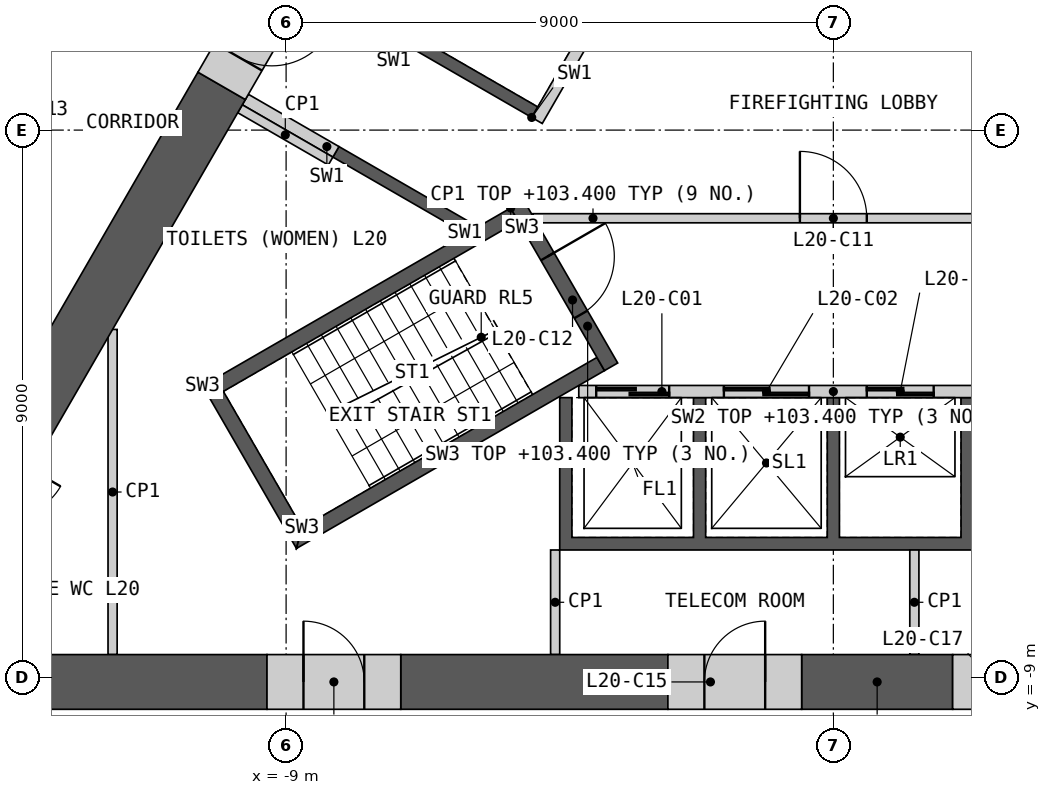
"""IFC4 building model, lengths in metres.
Left out: names, types, materials, properties, quantities, classifications, styles, units other than length and angle.
Written with IfcOpenShell. Run it as: python <this file> out.ifc"""

import sys

from ifc_helpers import new_model, si_unit, direction, frame, frame_2d, origin, place, context, subcontext, project, spatial, polyline, rectangle, outline, extrude, element, fill, save


model = new_model("IFC4")
c1 = context("Model", 3, precision=1e-05, world=origin(), true_north=direction((0.0, 1.0)))
c2 = subcontext(c1, "Body", "Model", "MODEL_VIEW")
j1 = project(units=[si_unit("LENGTHUNIT", "METRE"), si_unit("PLANEANGLEUNIT", "RADIAN")], contexts=[c1])
p1 = place(None, origin())
s1 = spatial("IfcSite", under=j1, at=p1, CompositionType="ELEMENT")
p2 = place(p1, origin())
s2 = spatial("IfcBuilding", under=s1, at=p2, CompositionType="ELEMENT")
p3 = place(p2, frame((0.0, 0.0, 99.6)))
s3 = spatial("IfcBuildingStorey", under=s2, at=p3, CompositionType="ELEMENT", Elevation=99.6)
p4 = place(p3, origin())
e1 = element("IfcWall", 1, at=p4, inside=s3, PredefinedType="SHEAR", context=c2, shape_type="SweptSolid", body=[
    extrude(outline(polyline([(4.5, -4.4), (4.5, -6.906), (-4.5, -6.906), (-4.5, -4.4), (-4.3, -4.4), (-4.3, -6.7), (-2.3, -6.7), (-2.3, -4.4), (-2.1, -4.4), (-2.1, -6.7), (-0.1, -6.7), (-0.1, -4.4), (0.1, -4.4), (0.1, -6.7), (2.1, -6.7), (2.1, -4.4), (2.3, -4.4), (2.3, -6.7), (4.3, -6.7), (4.3, -4.4), (4.5, -4.4)])), origin(), (0.0, 0.0, 1.0), 3.8),
])
p5 = place(p3, frame((-4.187, -4.3, 0.0), z_axis=(0.0, 0.0, 1.0), x_axis=(1.0, 0.0, 0.0)))
e2 = element("IfcWall", 2, at=p5, inside=s3, PredefinedType="SOLIDWALL", context=c2, shape_type="SweptSolid", body=[
    extrude(rectangle(XDim=8.373, YDim=0.2, at=frame_2d((4.187, 0.0))), origin(), (0.0, 0.0, 1.0), 3.8),
])
p6 = place(p5, frame((0.287, 0.0, 0.0)))
e3 = element("IfcOpeningElement", 3, at=p6, cuts=e2, PredefinedType="OPENING", context=c2, shape_type="SweptSolid", body=[
    extrude(rectangle(XDim=1.2, YDim=2.1, at=frame_2d((0.6, 1.05))), frame((0.0, 0.11, 0.0), z_axis=(0.0, -1.0, 0.0), x_axis=(1.0, 0.0, 0.0)), (0.0, 0.0, 1.0), 0.22),
])
p7 = place(p5, frame((2.387, 0.0, 0.0)))
e4 = element("IfcOpeningElement", 4, at=p7, cuts=e2, PredefinedType="OPENING", context=c2, shape_type="SweptSolid", body=[
    extrude(rectangle(XDim=1.4, YDim=2.1, at=frame_2d((0.7, 1.05))), frame((0.0, 0.11, 0.0), z_axis=(0.0, -1.0, 0.0), x_axis=(1.0, 0.0, 0.0)), (0.0, 0.0, 1.0), 0.22),
])
p8 = place(p5, frame((4.737, 0.0, 0.0)))
e5 = element("IfcOpeningElement", 5, at=p8, cuts=e2, PredefinedType="OPENING", context=c2, shape_type="SweptSolid", body=[
    extrude(rectangle(XDim=1.1, YDim=2.1, at=frame_2d((0.55, 1.05))), frame((0.0, 0.11, 0.0), z_axis=(0.0, -1.0, 0.0), x_axis=(1.0, 0.0, 0.0)), (0.0, 0.0, 1.0), 0.22),
])
p9 = place(p5, frame((6.887, 0.0, 0.0)))
e6 = element("IfcOpeningElement", 6, at=p9, cuts=e2, PredefinedType="OPENING", context=c2, shape_type="SweptSolid", body=[
    extrude(rectangle(XDim=1.2, YDim=2.1, at=frame_2d((0.6, 1.05))), frame((0.0, 0.11, 0.0), z_axis=(0.0, -1.0, 0.0), x_axis=(1.0, 0.0, 0.0)), (0.0, 0.0, 1.0), 0.22),
])
p10 = place(p3, frame((5.817, -1.476, 0.0), z_axis=(0.0, 0.0, 1.0), x_axis=(-0.500002616675, 0.866023893041, 0.0)))
e7 = element("IfcWall", 7, at=p10, inside=s3, PredefinedType="SOLIDWALL", context=c2, shape_type="SweptSolid", body=[
    extrude(rectangle(XDim=8.373, YDim=0.2, at=frame_2d((4.187, 0.0))), origin(), (0.0, 0.0, 1.0), 3.8),
])
p11 = place(p10, frame((0.337, 0.0, 0.0)))
e8 = element("IfcOpeningElement", 8, at=p11, cuts=e7, PredefinedType="OPENING", context=c2, shape_type="SweptSolid", body=[
    extrude(rectangle(XDim=1.1, YDim=2.1, at=frame_2d((0.55, 1.05))), frame((0.0, 0.11, 0.0), z_axis=(0.0, -1.0, 0.0), x_axis=(1.0, 0.0, 0.0)), (0.0, 0.0, 1.0), 0.22),
])
p12 = place(p10, frame((2.537, 0.0, 0.0)))
e9 = element("IfcOpeningElement", 9, at=p12, cuts=e7, PredefinedType="OPENING", context=c2, shape_type="SweptSolid", body=[
    extrude(rectangle(XDim=1.1, YDim=2.1, at=frame_2d((0.55, 1.05))), frame((0.0, 0.11, 0.0), z_axis=(0.0, -1.0, 0.0), x_axis=(1.0, 0.0, 0.0)), (0.0, 0.0, 1.0), 0.22),
])
p13 = place(p10, frame((4.737, 0.0, 0.0)))
e10 = element("IfcOpeningElement", 10, at=p13, cuts=e7, PredefinedType="OPENING", context=c2, shape_type="SweptSolid", body=[
    extrude(rectangle(XDim=1.1, YDim=2.1, at=frame_2d((0.55, 1.05))), frame((0.0, 0.11, 0.0), z_axis=(0.0, -1.0, 0.0), x_axis=(1.0, 0.0, 0.0)), (0.0, 0.0, 1.0), 0.22),
])
p14 = place(p10, frame((7.037, 0.0, 0.0)))
e11 = element("IfcOpeningElement", 11, at=p14, cuts=e7, PredefinedType="OPENING", context=c2, shape_type="SweptSolid", body=[
    extrude(rectangle(XDim=0.9, YDim=2.1, at=frame_2d((0.45, 1.05))), frame((0.0, 0.11, 0.0), z_axis=(0.0, -1.0, 0.0), x_axis=(1.0, 0.0, 0.0)), (0.0, 0.0, 1.0), 0.22),
])
p15 = place(p3, origin())
e12 = element("IfcWall", 12, at=p15, inside=s3, PredefinedType="SHEAR", context=c2, shape_type="SweptSolid", body=[
    extrude(outline(polyline([(-6.061, -1.697), (-8.231, -0.444), (-8.131, -0.271), (-5.96, -1.524), (-6.061, -1.697)])), origin(), (0.0, 0.0, 1.0), 3.8),
])
p16 = place(p3, origin())
e13 = element("IfcWall", 13, at=p16, inside=s3, PredefinedType="SHEAR", context=c2, shape_type="SweptSolid", body=[
    extrude(outline(polyline([(-4.96, 0.208), (-7.131, 1.461), (-5.931, 3.54), (-3.76, 2.287), (-3.861, 2.113), (-5.852, 3.263), (-6.852, 1.531), (-4.861, 0.381), (-4.96, 0.208)])), origin(), (0.0, 0.0, 1.0), 3.8),
])
p17 = place(p3, frame((-1.631, 5.776, 0.0), z_axis=(0.0, 0.0, 1.0), x_axis=(-0.499992876559, -0.866029516466, 0.0)))
e14 = element("IfcWall", 14, at=p17, inside=s3, PredefinedType="SOLIDWALL", context=c2, shape_type="SweptSolid", body=[
    extrude(rectangle(XDim=6.486, YDim=0.2, at=frame_2d((3.243, 0.0))), origin(), (0.0, 0.0, 1.0), 3.8),
])
p18 = place(p17, frame((0.437, 0.0, 0.0)))
e15 = element("IfcOpeningElement", 15, at=p18, cuts=e14, PredefinedType="OPENING", context=c2, shape_type="SweptSolid", body=[
    extrude(rectangle(XDim=0.9, YDim=2.1, at=frame_2d((0.45, 1.05))), frame((0.0, 0.11, 0.0), z_axis=(0.0, -1.0, 0.0), x_axis=(1.0, 0.0, 0.0)), (0.0, 0.0, 1.0), 0.22),
])
p19 = place(p17, frame((2.637, 0.0, 0.0)))
e16 = element("IfcOpeningElement", 16, at=p19, cuts=e14, PredefinedType="OPENING", context=c2, shape_type="SweptSolid", body=[
    extrude(rectangle(XDim=0.9, YDim=2.1, at=frame_2d((0.45, 1.05))), frame((0.0, 0.11, 0.0), z_axis=(0.0, -1.0, 0.0), x_axis=(1.0, 0.0, 0.0)), (0.0, 0.0, 1.0), 0.22),
])
p20 = place(p3, frame((-8.181, -0.357, 0.0), z_axis=(0.0, 0.0, 1.0), x_axis=(-0.866024871741, 0.500000921525, 0.0)))
e17 = element("IfcWall", 17, at=p20, inside=s3, PredefinedType="SHEAR", context=c2, shape_type="SweptSolid", body=[
    extrude(rectangle(XDim=1.72, YDim=0.2, at=frame_2d((0.86, 0.0))), origin(), (0.0, 0.0, 1.0), 3.8),
])
p21 = place(p3, frame((-4.941, -1.45, 0.0), z_axis=(0.0, 0.0, 1.0), x_axis=(1.0, 0.0, 0.0)))
e18 = element("IfcWall", 18, at=p21, inside=s3, PredefinedType="PARTITIONING", context=c2, shape_type="SweptSolid", body=[
    extrude(rectangle(XDim=9.882, YDim=0.15, at=frame_2d((4.941, 0.0))), origin(), (0.0, 0.0, 1.0), 3.8),
])
p22 = place(p21, frame((4.391, 0.0, 0.0)))
e19 = element("IfcOpeningElement", 19, at=p22, cuts=e18, PredefinedType="OPENING", context=c2, shape_type="SweptSolid", body=[
    extrude(rectangle(XDim=1.1, YDim=2.1, at=frame_2d((0.55, 1.05))), frame((0.0, 0.085, 0.0), z_axis=(0.0, -1.0, 0.0), x_axis=(1.0, 0.0, 0.0)), (0.0, 0.0, 1.0), 0.17),
])
p23 = place(p3, origin())
e20 = element("IfcWall", 20, at=p23, inside=s3, PredefinedType="SHEAR", context=c2, shape_type="SweptSolid", body=[
    extrude(outline(polyline([(-5.307, -1.281), (-10.374, -4.206), (-10.032, -4.298), (-5.182, -1.498), (-5.307, -1.281)])), origin(), (0.0, 0.0, 1.0), 3.8),
])
p24 = place(p3, origin())
e21 = element("IfcWall", 21, at=p24, inside=s3, PredefinedType="SHEAR", context=c2, shape_type="SweptSolid", body=[
    extrude(outline(polyline([(-10.374, -4.206), (-8.83, -6.881), (-8.738, -6.539), (-10.032, -4.298), (-10.374, -4.206)])), origin(), (0.0, 0.0, 1.0), 3.8),
])
p25 = place(p3, origin())
e22 = element("IfcWall", 22, at=p25, inside=s3, PredefinedType="SHEAR", context=c2, shape_type="SweptSolid", body=[
    extrude(outline(polyline([(-8.738, -6.539), (-8.83, -6.881), (-3.763, -3.956), (-3.888, -3.739), (-8.738, -6.539)])), origin(), (0.0, 0.0, 1.0), 3.8),
])
p26 = place(p3, frame((-5.199, -1.219, 0.0), z_axis=(0.0, 0.0, 1.0), x_axis=(0.499982516597, -0.866035497597, 0.0)))
e23 = element("IfcWall", 23, at=p26, inside=s3, PredefinedType="SHEAR", context=c2, shape_type="SweptSolid", body=[
    extrude(rectangle(XDim=3.088, YDim=0.25, at=frame_2d((1.544, 0.0))), origin(), (0.0, 0.0, 1.0), 3.8),
])
p27 = place(p26, frame((0.994, 0.0, 0.0)))
e24 = element("IfcOpeningElement", 24, at=p27, cuts=e23, PredefinedType="OPENING", context=c2, shape_type="SweptSolid", body=[
    extrude(rectangle(XDim=1.1, YDim=2.1, at=frame_2d((0.55, 1.05))), frame((0.0, 0.135, 0.0), z_axis=(0.0, -1.0, 0.0), x_axis=(1.0, 0.0, 0.0)), (0.0, 0.0, 1.0), 0.27),
])
for number, where, z_axis, x_axis in (
    (25, (-8.268, -0.509, 0.0), (0.0, 0.0, 1.0), (-0.866, 0.5, 0.0)),
    (26, (-4.575, -6.906, 0.0), (0.0, 0.0, 1.0), (0.0, -1.0, 0.0)),
    (27, (1.333, -8.626, 0.0), (0.0, 0.0, 1.0), (0.0, 1.0, 0.0)),
):
    element("IfcWall", number, at=place(p3, frame(where, z_axis=z_axis, x_axis=x_axis)), inside=s3, PredefinedType="PARTITIONING", context=c2, shape_type="SweptSolid", body=[
        extrude(rectangle(XDim=1.72, YDim=0.15, at=frame_2d((0.86, 0.0))), origin(), (0.0, 0.0, 1.0), 3.8),
    ])
p28 = place(p3, frame((-11.854, -8.626, 0.0), z_axis=(0.0, 0.0, 1.0), x_axis=(0.0, 1.0, 0.0)))
e28 = element("IfcWall", 28, at=p28, inside=s3, PredefinedType="PARTITIONING", context=c2, shape_type="SweptSolid", body=[
    extrude(rectangle(XDim=5.347, YDim=0.15, at=frame_2d((2.674, 0.0))), origin(), (0.0, 0.0, 1.0), 3.8),
])
p29 = place(p3, frame((-14.941, -9.076, 0.0), z_axis=(0.0, 0.0, 1.0), x_axis=(1.0, 0.0, 0.0)))
e29 = element("IfcWall", 29, at=p29, inside=s3, PredefinedType="SHEAR", context=c2, shape_type="SweptSolid", body=[
    extrude(rectangle(XDim=5.627, YDim=0.9, at=frame_2d((2.813, 0.0))), origin(), (0.0, 0.0, 1.0), 3.8),
])
p30 = place(p3, frame((-7.115, -9.076, 0.0), z_axis=(0.0, 0.0, 1.0), x_axis=(1.0, 0.0, 0.0)))
e30 = element("IfcWall", 30, at=p30, inside=s3, PredefinedType="SHEAR", context=c2, shape_type="SweptSolid", body=[
    extrude(rectangle(XDim=4.393, YDim=0.9, at=frame_2d((2.197, 0.0))), origin(), (0.0, 0.0, 1.0), 3.8),
])
p31 = place(p3, frame((-0.521, -9.076, 0.0), z_axis=(0.0, 0.0, 1.0), x_axis=(1.0, 0.0, 0.0)))
e31 = element("IfcWall", 31, at=p31, inside=s3, PredefinedType="SHEAR", context=c2, shape_type="SweptSolid", body=[
    extrude(rectangle(XDim=2.483, YDim=0.9, at=frame_2d((1.242, 0.0))), origin(), (0.0, 0.0, 1.0), 3.8),
])
p32 = place(p3, frame((-10.06, 0.728, 0.0), z_axis=(0.0, 0.0, 1.0), x_axis=(-0.500002975332, -0.866023685969, 0.0)))
e32 = element("IfcWall", 32, at=p32, inside=s3, PredefinedType="SHEAR", context=c2, shape_type="SweptSolid", body=[
    extrude(rectangle(XDim=6.429, YDim=0.9, at=frame_2d((3.214, 0.0))), origin(), (0.0, 0.0, 1.0), 3.8),
])
p33 = place(p3, frame((-2.721, -9.076, 0.0), z_axis=(0.0, 0.0, 1.0), x_axis=(1.0, 0.0, 0.0)))
e33 = element("IfcWall", 33, at=p33, inside=s3, PredefinedType="SHEAR", context=c2, shape_type="SweptSolid", body=[
    extrude(rectangle(XDim=2.2, YDim=0.9, at=frame_2d((1.1, 0.0))), origin(), (0.0, 0.0, 1.0), 3.8),
])
p34 = place(p33, frame((0.6, 0.0, 0.0)))
e34 = element("IfcOpeningElement", 34, at=p34, cuts=e33, PredefinedType="OPENING", context=c2, shape_type="SweptSolid", body=[
    extrude(rectangle(XDim=1.0, YDim=2.1, at=frame_2d((0.5, 1.05))), frame((0.0, 0.46, 0.0), z_axis=(0.0, -1.0, 0.0), x_axis=(1.0, 0.0, 0.0)), (0.0, 0.0, 1.0), 0.92),
])
p35 = place(p3, frame((1.962, -9.076, 0.0), z_axis=(0.0, 0.0, 1.0), x_axis=(1.0, 0.0, 0.0)))
e35 = element("IfcWall", 35, at=p35, inside=s3, PredefinedType="SHEAR", context=c2, shape_type="SweptSolid", body=[
    extrude(rectangle(XDim=2.2, YDim=0.9, at=frame_2d((1.1, 0.0))), origin(), (0.0, 0.0, 1.0), 3.8),
])
p36 = place(p35, frame((0.6, 0.0, 0.0)))
e36 = element("IfcOpeningElement", 36, at=p36, cuts=e35, PredefinedType="OPENING", context=c2, shape_type="SweptSolid", body=[
    extrude(rectangle(XDim=1.0, YDim=2.1, at=frame_2d((0.5, 1.05))), frame((0.0, 0.46, 0.0), z_axis=(0.0, -1.0, 0.0), x_axis=(1.0, 0.0, 0.0)), (0.0, 0.0, 1.0), 0.92),
])
p37 = place(p3, frame((-9.314, -9.076, 0.0), z_axis=(0.0, 0.0, 1.0), x_axis=(1.0, 0.0, 0.0)))
e37 = element("IfcWall", 37, at=p37, inside=s3, PredefinedType="SHEAR", context=c2, shape_type="SweptSolid", body=[
    extrude(rectangle(XDim=2.2, YDim=0.9, at=frame_2d((1.1, 0.0))), origin(), (0.0, 0.0, 1.0), 3.8),
])
p38 = place(p37, frame((0.6, 0.0, 0.0)))
e38 = element("IfcOpeningElement", 38, at=p38, cuts=e37, PredefinedType="OPENING", context=c2, shape_type="SweptSolid", body=[
    extrude(rectangle(XDim=1.0, YDim=2.1, at=frame_2d((0.5, 1.05))), frame((0.0, 0.46, 0.0), z_axis=(0.0, -1.0, 0.0), x_axis=(1.0, 0.0, 0.0)), (0.0, 0.0, 1.0), 0.92),
])
p39 = place(p3, frame((-8.96, 2.633, 0.0), z_axis=(0.0, 0.0, 1.0), x_axis=(-0.50002983664, -0.866008176907, 0.0)))
e39 = element("IfcWall", 39, at=p39, inside=s3, PredefinedType="SHEAR", context=c2, shape_type="SweptSolid", body=[
    extrude(rectangle(XDim=2.2, YDim=0.9, at=frame_2d((1.1, 0.0))), origin(), (0.0, 0.0, 1.0), 3.8),
])
p40 = place(p39, frame((0.55, 0.0, 0.0)))
e40 = element("IfcOpeningElement", 40, at=p40, cuts=e39, PredefinedType="OPENING", context=c2, shape_type="SweptSolid", body=[
    extrude(rectangle(XDim=1.1, YDim=2.1, at=frame_2d((0.55, 1.05))), frame((0.0, 0.46, 0.0), z_axis=(0.0, -1.0, 0.0), x_axis=(1.0, 0.0, 0.0)), (0.0, 0.0, 1.0), 0.92),
])
p41 = place(p3, frame((-15.326, -2.693, 0.0), z_axis=(0.0, 0.0, 1.0), x_axis=(0.500010522431, 0.866019328571, 0.0)))
e41 = element("IfcWall", 41, at=p41, inside=s3, PredefinedType="PARTITIONING", context=c2, shape_type="SweptSolid", body=[
    extrude(rectangle(XDim=9.733, YDim=0.2, at=frame_2d((4.866, 0.0))), origin(), (0.0, 0.0, 1.0), 3.8),
])
p42 = place(p41, frame((3.966, 0.0, 0.0)))
e42 = element("IfcOpeningElement", 42, at=p42, cuts=e41, PredefinedType="OPENING", context=c2, shape_type="SweptSolid", body=[
    extrude(rectangle(XDim=1.8, YDim=2.1, at=frame_2d((0.9, 1.05))), frame((0.0, 0.11, 0.0), z_axis=(0.0, -1.0, 0.0), x_axis=(1.0, 0.0, 0.0)), (0.0, 0.0, 1.0), 0.22),
])
p43 = place(p6, origin())
e43 = element("IfcDoor", 43, at=p43, inside=s3, OperationType="SLIDING_TO_LEFT", PredefinedType="DOOR", context=c2, shape_type="SweptSolid", body=[
    extrude(rectangle(XDim=1.2, YDim=2.1, at=frame_2d((0.6, 1.05))), frame((0.0, 0.025, 0.0), z_axis=(0.0, -1.0, 0.0), x_axis=(1.0, 0.0, 0.0)), (0.0, 0.0, 1.0), 0.05),
])
fill(e3, e43)
p44 = place(p7, origin())
e44 = element("IfcDoor", 44, at=p44, inside=s3, OperationType="SLIDING_TO_LEFT", PredefinedType="DOOR", context=c2, shape_type="SweptSolid", body=[
    extrude(rectangle(XDim=1.4, YDim=2.1, at=frame_2d((0.7, 1.05))), frame((0.0, 0.025, 0.0), z_axis=(0.0, -1.0, 0.0), x_axis=(1.0, 0.0, 0.0)), (0.0, 0.0, 1.0), 0.05),
])
fill(e4, e44)
p45 = place(p8, origin())
e45 = element("IfcDoor", 45, at=p45, inside=s3, OperationType="SLIDING_TO_LEFT", PredefinedType="DOOR", context=c2, shape_type="SweptSolid", body=[
    extrude(rectangle(XDim=1.1, YDim=2.1, at=frame_2d((0.55, 1.05))), frame((0.0, 0.025, 0.0), z_axis=(0.0, -1.0, 0.0), x_axis=(1.0, 0.0, 0.0)), (0.0, 0.0, 1.0), 0.05),
])
fill(e5, e45)
p46 = place(p22, origin())
e46 = element("IfcDoor", 46, at=p46, inside=s3, OperationType="SINGLE_SWING_LEFT", PredefinedType="DOOR", context=c2, shape_type="SweptSolid", body=[
    extrude(rectangle(XDim=1.1, YDim=2.1, at=frame_2d((0.55, 1.05))), frame((0.0, 0.025, 0.0), z_axis=(0.0, -1.0, 0.0), x_axis=(1.0, 0.0, 0.0)), (0.0, 0.0, 1.0), 0.05),
])
fill(e19, e46)
p47 = place(p27, origin())
e47 = element("IfcDoor", 47, at=p47, inside=s3, OperationType="SINGLE_SWING_LEFT", PredefinedType="DOOR", context=c2, shape_type="SweptSolid", body=[
    extrude(rectangle(XDim=1.1, YDim=2.1, at=frame_2d((0.55, 1.05))), frame((0.0, 0.025, 0.0), z_axis=(0.0, -1.0, 0.0), x_axis=(1.0, 0.0, 0.0)), (0.0, 0.0, 1.0), 0.05),
])
fill(e24, e47)
p48 = place(p34, origin())
e48 = element("IfcDoor", 48, at=p48, inside=s3, OperationType="SINGLE_SWING_RIGHT", PredefinedType="DOOR", context=c2, shape_type="SweptSolid", body=[
    extrude(rectangle(XDim=1.0, YDim=2.1, at=frame_2d((0.5, 1.05))), frame((0.0, 0.205, 0.0), z_axis=(0.0, -1.0, 0.0), x_axis=(1.0, 0.0, 0.0)), (0.0, 0.0, 1.0), 0.05),
])
fill(e34, e48)
p49 = place(p38, origin())
e49 = element("IfcDoor", 49, at=p49, inside=s3, OperationType="SINGLE_SWING_LEFT", PredefinedType="DOOR", context=c2, shape_type="SweptSolid", body=[
    extrude(rectangle(XDim=1.0, YDim=2.1, at=frame_2d((0.5, 1.05))), frame((0.0, 0.205, 0.0), z_axis=(0.0, -1.0, 0.0), x_axis=(1.0, 0.0, 0.0)), (0.0, 0.0, 1.0), 0.05),
])
fill(e38, e49)
p50 = place(p40, origin())
e50 = element("IfcDoor", 50, at=p50, inside=s3, OperationType="SINGLE_SWING_LEFT", PredefinedType="DOOR", context=c2, shape_type="SweptSolid", body=[
    extrude(rectangle(XDim=1.1, YDim=2.1, at=frame_2d((0.55, 1.05))), frame((0.0, 0.205, 0.0), z_axis=(0.0, -1.0, 0.0), x_axis=(1.0, 0.0, 0.0)), (0.0, 0.0, 1.0), 0.05),
])
fill(e40, e50)
p51 = place(p42, origin())
e51 = element("IfcDoor", 51, at=p51, inside=s3, OperationType="DOUBLE_DOOR_SINGLE_SWING", PredefinedType="DOOR", context=c2, shape_type="SweptSolid", body=[
    extrude(rectangle(XDim=1.8, YDim=2.1, at=frame_2d((0.9, 1.05))), frame((0.0, 0.025, 0.0), z_axis=(0.0, -1.0, 0.0), x_axis=(1.0, 0.0, 0.0)), (0.0, 0.0, 1.0), 0.05),
])
fill(e42, e51)
save(model, sys.argv[1])
